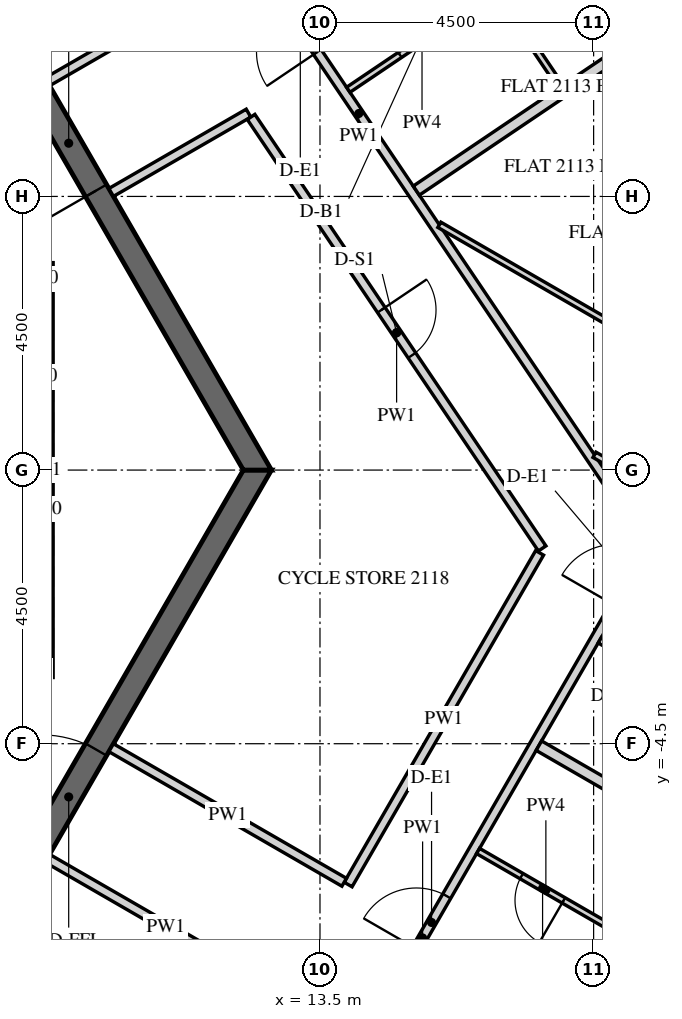
"""IFC4 building model, lengths in metres.
Left out: names, types, materials, properties, quantities, classifications, styles, units other than length and angle.
Written with IfcOpenShell. Run it as: python <this file> out.ifc"""

import sys

from ifc_helpers import new_model, si_unit, direction, frame, frame_2d, origin, place, context, subcontext, project, spatial, polyline, rectangle, outline, extrude, element, fill, save


model = new_model("IFC4")
c1 = context("Model", 3, precision=1e-05, world=origin(), true_north=direction((0.0, 1.0)))
c2 = subcontext(c1, "Body", "Model", "MODEL_VIEW")
j1 = project(units=[si_unit("LENGTHUNIT", "METRE"), si_unit("PLANEANGLEUNIT", "RADIAN")], contexts=[c1])
p1 = place(None, origin())
s1 = spatial("IfcSite", under=j1, at=p1, CompositionType="ELEMENT")
p2 = place(p1, origin())
s2 = spatial("IfcBuilding", under=s1, at=p2, CompositionType="ELEMENT")
p3 = place(p2, frame((0.0, 0.0, 267.9)))
s3 = spatial("IfcBuildingStorey", under=s2, at=p3, CompositionType="ELEMENT", Elevation=267.9)
p4 = place(p3, frame((16.451, -23.005, -0.15), z_axis=(0.0, 0.0, 1.0), x_axis=(0.500003737743, 0.866023245787, 0.0)))
e1 = element("IfcWall", 1, at=p4, inside=s3, PredefinedType="SOLIDWALL", context=c2, shape_type="SweptSolid", body=[
    extrude(outline(polyline([(-0.021, -0.25), (25.468, -0.25), (25.421, 0.25), (0.021, 0.25), (-0.021, -0.25)])), origin(), (0.0, 0.0, 1.0), 3.9),
])
p5 = place(p4, frame((2.522, 0.0, 0.75)))
e2 = element("IfcOpeningElement", 2, at=p5, cuts=e1, PredefinedType="OPENING", context=c2, shape_type="SweptSolid", body=[
    extrude(rectangle(XDim=2.4, YDim=2.7, at=frame_2d((1.2, 1.35))), frame((0.0, 0.26, 0.0), z_axis=(0.0, -1.0, 0.0), x_axis=(1.0, 0.0, 0.0)), (0.0, 0.0, 1.0), 0.52),
])
p6 = place(p4, frame((6.122, 0.0, 0.75)))
e3 = element("IfcOpeningElement", 3, at=p6, cuts=e1, PredefinedType="OPENING", context=c2, shape_type="SweptSolid", body=[
    extrude(rectangle(XDim=2.4, YDim=2.7, at=frame_2d((1.2, 1.35))), frame((0.0, 0.26, 0.0), z_axis=(0.0, -1.0, 0.0), x_axis=(1.0, 0.0, 0.0)), (0.0, 0.0, 1.0), 0.52),
])
p7 = place(p4, frame((9.722, 0.0, 0.75)))
e4 = element("IfcOpeningElement", 4, at=p7, cuts=e1, PredefinedType="OPENING", context=c2, shape_type="SweptSolid", body=[
    extrude(rectangle(XDim=2.4, YDim=2.7, at=frame_2d((1.2, 1.35))), frame((0.0, 0.26, 0.0), z_axis=(0.0, -1.0, 0.0), x_axis=(1.0, 0.0, 0.0)), (0.0, 0.0, 1.0), 0.52),
])
p8 = place(p4, frame((13.323, 0.0, 0.75)))
e5 = element("IfcOpeningElement", 5, at=p8, cuts=e1, PredefinedType="OPENING", context=c2, shape_type="SweptSolid", body=[
    extrude(rectangle(XDim=2.4, YDim=2.7, at=frame_2d((1.2, 1.35))), frame((0.0, 0.26, 0.0), z_axis=(0.0, -1.0, 0.0), x_axis=(1.0, 0.0, 0.0)), (0.0, 0.0, 1.0), 0.52),
])
p9 = place(p4, frame((16.922, 0.0, 0.75)))
e6 = element("IfcOpeningElement", 6, at=p9, cuts=e1, PredefinedType="OPENING", context=c2, shape_type="SweptSolid", body=[
    extrude(rectangle(XDim=2.4, YDim=2.7, at=frame_2d((1.2, 1.35))), frame((0.0, 0.26, 0.0), z_axis=(0.0, -1.0, 0.0), x_axis=(1.0, 0.0, 0.0)), (0.0, 0.0, 1.0), 0.52),
])
p10 = place(p4, frame((20.522, 0.0, 0.75)))
e7 = element("IfcOpeningElement", 7, at=p10, cuts=e1, PredefinedType="OPENING", context=c2, shape_type="SweptSolid", body=[
    extrude(rectangle(XDim=2.4, YDim=2.7, at=frame_2d((1.2, 1.35))), frame((0.0, 0.26, 0.0), z_axis=(0.0, -1.0, 0.0), x_axis=(1.0, 0.0, 0.0)), (0.0, 0.0, 1.0), 0.52),
])
p11 = place(p3, frame((26.706, 2.879, -0.15), z_axis=(0.0, 0.0, 1.0), x_axis=(-0.559197891507, 0.829034208061, 0.0)))
e8 = element("IfcWall", 8, at=p11, inside=s3, PredefinedType="SOLIDWALL", context=c2, shape_type="SweptSolid", body=[
    extrude(outline(polyline([(0.25, -0.25), (22.795, -0.25), (23.295, 0.25), (-0.25, 0.25), (0.25, -0.25)])), origin(), (0.0, 0.0, 1.0), 3.9),
])
p12 = place(p11, frame((1.323, 0.0, 1.05)))
e9 = element("IfcOpeningElement", 9, at=p12, cuts=e8, PredefinedType="OPENING", context=c2, shape_type="SweptSolid", body=[
    extrude(rectangle(XDim=0.9, YDim=1.5, at=frame_2d((0.45, 0.75))), frame((0.0, 0.26, 0.0), z_axis=(0.0, -1.0, 0.0), x_axis=(1.0, 0.0, 0.0)), (0.0, 0.0, 1.0), 0.52),
])
p13 = place(p11, frame((2.522, 0.0, 0.15)))
e10 = element("IfcOpeningElement", 10, at=p13, cuts=e8, PredefinedType="OPENING", context=c2, shape_type="SweptSolid", body=[
    extrude(rectangle(XDim=1.2, YDim=2.4, at=frame_2d((0.6, 1.2))), frame((0.0, 0.26, 0.0), z_axis=(0.0, -1.0, 0.0), x_axis=(1.0, 0.0, 0.0)), (0.0, 0.0, 1.0), 0.52),
])
p14 = place(p11, frame((4.922, 0.0, 1.05)))
e11 = element("IfcOpeningElement", 11, at=p14, cuts=e8, PredefinedType="OPENING", context=c2, shape_type="SweptSolid", body=[
    extrude(rectangle(XDim=0.9, YDim=1.5, at=frame_2d((0.45, 0.75))), frame((0.0, 0.26, 0.0), z_axis=(0.0, -1.0, 0.0), x_axis=(1.0, 0.0, 0.0)), (0.0, 0.0, 1.0), 0.52),
])
p15 = place(p11, frame((6.122, 0.0, 0.15)))
e12 = element("IfcOpeningElement", 12, at=p15, cuts=e8, PredefinedType="OPENING", context=c2, shape_type="SweptSolid", body=[
    extrude(rectangle(XDim=1.2, YDim=2.4, at=frame_2d((0.6, 1.2))), frame((0.0, 0.26, 0.0), z_axis=(0.0, -1.0, 0.0), x_axis=(1.0, 0.0, 0.0)), (0.0, 0.0, 1.0), 0.52),
])
p16 = place(p11, frame((8.522, 0.0, 1.05)))
e13 = element("IfcOpeningElement", 13, at=p16, cuts=e8, PredefinedType="OPENING", context=c2, shape_type="SweptSolid", body=[
    extrude(rectangle(XDim=0.9, YDim=1.5, at=frame_2d((0.45, 0.75))), frame((0.0, 0.26, 0.0), z_axis=(0.0, -1.0, 0.0), x_axis=(1.0, 0.0, 0.0)), (0.0, 0.0, 1.0), 0.52),
])
p17 = place(p11, frame((9.722, 0.0, 0.15)))
e14 = element("IfcOpeningElement", 14, at=p17, cuts=e8, PredefinedType="OPENING", context=c2, shape_type="SweptSolid", body=[
    extrude(rectangle(XDim=1.2, YDim=2.4, at=frame_2d((0.6, 1.2))), frame((0.0, 0.26, 0.0), z_axis=(0.0, -1.0, 0.0), x_axis=(1.0, 0.0, 0.0)), (0.0, 0.0, 1.0), 0.52),
])
p18 = place(p11, frame((12.122, 0.0, 1.05)))
e15 = element("IfcOpeningElement", 15, at=p18, cuts=e8, PredefinedType="OPENING", context=c2, shape_type="SweptSolid", body=[
    extrude(rectangle(XDim=0.9, YDim=1.5, at=frame_2d((0.45, 0.75))), frame((0.0, 0.26, 0.0), z_axis=(0.0, -1.0, 0.0), x_axis=(1.0, 0.0, 0.0)), (0.0, 0.0, 1.0), 0.52),
])
p19 = place(p11, frame((13.323, 0.0, 0.15)))
e16 = element("IfcOpeningElement", 16, at=p19, cuts=e8, PredefinedType="OPENING", context=c2, shape_type="SweptSolid", body=[
    extrude(rectangle(XDim=1.2, YDim=2.4, at=frame_2d((0.6, 1.2))), frame((0.0, 0.26, 0.0), z_axis=(0.0, -1.0, 0.0), x_axis=(1.0, 0.0, 0.0)), (0.0, 0.0, 1.0), 0.52),
])
p20 = place(p11, frame((15.722, 0.0, 1.05)))
e17 = element("IfcOpeningElement", 17, at=p20, cuts=e8, PredefinedType="OPENING", context=c2, shape_type="SweptSolid", body=[
    extrude(rectangle(XDim=0.9, YDim=1.5, at=frame_2d((0.45, 0.75))), frame((0.0, 0.26, 0.0), z_axis=(0.0, -1.0, 0.0), x_axis=(1.0, 0.0, 0.0)), (0.0, 0.0, 1.0), 0.52),
])
p21 = place(p11, frame((16.922, 0.0, 0.15)))
e18 = element("IfcOpeningElement", 18, at=p21, cuts=e8, PredefinedType="OPENING", context=c2, shape_type="SweptSolid", body=[
    extrude(rectangle(XDim=1.2, YDim=2.4, at=frame_2d((0.6, 1.2))), frame((0.0, 0.26, 0.0), z_axis=(0.0, -1.0, 0.0), x_axis=(1.0, 0.0, 0.0)), (0.0, 0.0, 1.0), 0.52),
])
p22 = place(p11, frame((19.323, 0.0, 1.05)))
e19 = element("IfcOpeningElement", 19, at=p22, cuts=e8, PredefinedType="OPENING", context=c2, shape_type="SweptSolid", body=[
    extrude(rectangle(XDim=0.9, YDim=1.5, at=frame_2d((0.45, 0.75))), frame((0.0, 0.26, 0.0), z_axis=(0.0, -1.0, 0.0), x_axis=(1.0, 0.0, 0.0)), (0.0, 0.0, 1.0), 0.52),
])
p23 = place(p11, frame((20.522, 0.0, 0.15)))
e20 = element("IfcOpeningElement", 20, at=p23, cuts=e8, PredefinedType="OPENING", context=c2, shape_type="SweptSolid", body=[
    extrude(rectangle(XDim=1.2, YDim=2.4, at=frame_2d((0.6, 1.2))), frame((0.0, 0.26, 0.0), z_axis=(0.0, -1.0, 0.0), x_axis=(1.0, 0.0, 0.0)), (0.0, 0.0, 1.0), 0.52),
])
p24 = place(p3, frame((6.235, -10.8, -0.15), z_axis=(0.0, 0.0, 1.0), x_axis=(0.499996419489, 0.866027470984, 0.0)))
e21 = element("IfcWall", 21, at=p24, inside=s3, PredefinedType="SHEAR", context=c2, shape_type="SweptSolid", body=[
    extrude(outline(polyline([(-0.115, -0.2), (12.586, -0.2), (12.355, 0.2), (0.115, 0.2), (-0.115, -0.2)])), origin(), (0.0, 0.0, 1.0), 3.9),
])
p25 = place(p24, frame((5.364, 0.0, 0.15)))
e22 = element("IfcOpeningElement", 22, at=p25, cuts=e21, PredefinedType="OPENING", context=c2, shape_type="SweptSolid", body=[
    extrude(rectangle(XDim=1.8, YDim=2.4, at=frame_2d((0.9, 1.2))), frame((0.0, 0.21, 0.0), z_axis=(0.0, -1.0, 0.0), x_axis=(1.0, 0.0, 0.0)), (0.0, 0.0, 1.0), 0.42),
])
p26 = place(p3, frame((12.471, 0.0, -0.15), z_axis=(0.0, 0.0, 1.0), x_axis=(-0.499996419489, 0.866027470984, 0.0)))
e23 = element("IfcWall", 23, at=p26, inside=s3, PredefinedType="SHEAR", context=c2, shape_type="SweptSolid", body=[
    extrude(outline(polyline([(-0.115, -0.2), (12.586, -0.2), (12.355, 0.2), (0.115, 0.2), (-0.115, -0.2)])), origin(), (0.0, 0.0, 1.0), 3.9),
])
p27 = place(p26, frame((5.306, 0.0, 0.15)))
e24 = element("IfcOpeningElement", 24, at=p27, cuts=e23, PredefinedType="OPENING", context=c2, shape_type="SweptSolid", body=[
    extrude(rectangle(XDim=1.8, YDim=2.4, at=frame_2d((0.9, 1.2))), frame((0.0, 0.21, 0.0), z_axis=(0.0, -1.0, 0.0), x_axis=(1.0, 0.0, 0.0)), (0.0, 0.0, 1.0), 0.42),
])
p28 = place(p3, frame((11.454, -14.16, 0.0), z_axis=(0.0, 0.0, 1.0), x_axis=(0.500000296604, 0.86602523254, 0.0)))
e25 = element("IfcWall", 25, at=p28, inside=s3, PredefinedType="PARTITIONING", context=c2, shape_type="SweptSolid", body=[
    extrude(rectangle(XDim=14.934, YDim=0.15, at=frame_2d((7.467, 0.0))), origin(), (0.0, 0.0, 1.0), 2.988),
])
p29 = place(p28, frame((7.261, 0.0, 0.0)))
e26 = element("IfcOpeningElement", 26, at=p29, cuts=e25, PredefinedType="OPENING", context=c2, shape_type="SweptSolid", body=[
    extrude(rectangle(XDim=1.0, YDim=2.1, at=frame_2d((0.5, 1.05))), frame((0.0, 0.085, 0.0), z_axis=(0.0, -1.0, 0.0), x_axis=(1.0, 0.0, 0.0)), (0.0, 0.0, 1.0), 0.17),
])
p30 = place(p28, frame((13.784, 0.0, 0.0)))
e27 = element("IfcOpeningElement", 27, at=p30, cuts=e25, PredefinedType="OPENING", context=c2, shape_type="SweptSolid", body=[
    extrude(rectangle(XDim=1.0, YDim=2.1, at=frame_2d((0.5, 1.05))), frame((0.0, 0.085, 0.0), z_axis=(0.0, -1.0, 0.0), x_axis=(1.0, 0.0, 0.0)), (0.0, 0.0, 1.0), 0.17),
])
p31 = place(p3, frame((18.875, -1.158, 0.0), z_axis=(0.0, 0.0, 1.0), x_axis=(-0.55919880344, 0.829033592945, 0.0)))
e28 = element("IfcWall", 28, at=p31, inside=s3, PredefinedType="PARTITIONING", context=c2, shape_type="SweptSolid", body=[
    extrude(rectangle(XDim=16.939, YDim=0.15, at=frame_2d((8.47, 0.0))), origin(), (0.0, 0.0, 1.0), 2.988),
])
p32 = place(p31, frame((9.69, 0.0, 0.0)))
e29 = element("IfcOpeningElement", 29, at=p32, cuts=e28, PredefinedType="OPENING", context=c2, shape_type="SweptSolid", body=[
    extrude(rectangle(XDim=1.0, YDim=2.1, at=frame_2d((0.5, 1.05))), frame((0.0, 0.085, 0.0), z_axis=(0.0, -1.0, 0.0), x_axis=(1.0, 0.0, 0.0)), (0.0, 0.0, 1.0), 0.17),
])
p33 = place(p3, frame((10.066, 4.566, 0.0), z_axis=(0.0, 0.0, 1.0), x_axis=(0.866034402474, 0.499984413489, 0.0)))
e30 = element("IfcWall", 30, at=p33, inside=s3, PredefinedType="PARTITIONING", context=c2, shape_type="SweptSolid", body=[
    extrude(rectangle(XDim=2.608, YDim=0.15, at=frame_2d((1.304, 0.0))), origin(), (0.0, 0.0, 1.0), 2.988),
])
p34 = place(p3, frame((12.367, 5.808, 0.0), z_axis=(0.0, 0.0, 1.0), x_axis=(0.559187256666, -0.829041381345, 0.0)))
e31 = element("IfcWall", 31, at=p34, inside=s3, PredefinedType="PARTITIONING", context=c2, shape_type="SweptSolid", body=[
    extrude(rectangle(XDim=8.56, YDim=0.15, at=frame_2d((4.28, 0.0))), origin(), (0.0, 0.0, 1.0), 2.988),
])
p35 = place(p34, frame((3.83, 0.0, 0.0)))
e32 = element("IfcOpeningElement", 32, at=p35, cuts=e31, PredefinedType="OPENING", context=c2, shape_type="SweptSolid", body=[
    extrude(rectangle(XDim=0.9, YDim=2.1, at=frame_2d((0.45, 1.05))), frame((0.0, 0.085, 0.0), z_axis=(0.0, -1.0, 0.0), x_axis=(1.0, 0.0, 0.0)), (0.0, 0.0, 1.0), 0.17),
])
p36 = place(p3, frame((17.112, -1.362, 0.0), z_axis=(0.0, 0.0, 1.0), x_axis=(-0.49999985423, -0.866025487945, 0.0)))
e33 = element("IfcWall", 33, at=p36, inside=s3, PredefinedType="PARTITIONING", context=c2, shape_type="SweptSolid", body=[
    extrude(rectangle(XDim=6.298, YDim=0.15, at=frame_2d((3.149, 0.0))), origin(), (0.0, 0.0, 1.0), 2.988),
])
p37 = place(p3, frame((13.898, -6.778, 0.0), z_axis=(0.0, 0.0, 1.0), x_axis=(-0.866041342403, 0.499972392486, 0.0)))
e34 = element("IfcWall", 34, at=p37, inside=s3, PredefinedType="PARTITIONING", context=c2, shape_type="SweptSolid", body=[
    extrude(rectangle(XDim=4.425, YDim=0.15, at=frame_2d((2.212, 0.0))), origin(), (0.0, 0.0, 1.0), 2.988),
])
p38 = place(p3, frame((9.016, -6.384, 0.0), z_axis=(0.0, 0.0, 1.0), x_axis=(0.866031096941, -0.499990139034, 0.0)))
e35 = element("IfcWall", 35, at=p38, inside=s3, PredefinedType="PARTITIONING", context=c2, shape_type="SweptSolid", body=[
    extrude(rectangle(XDim=4.5, YDim=0.15, at=frame_2d((2.25, 0.0))), origin(), (0.0, 0.0, 1.0), 2.988),
])
p39 = place(p3, frame((11.082, 7.578, 0.0), z_axis=(0.0, 0.0, 1.0), x_axis=(-0.865993065409, -0.500056007527, 0.0)))
e36 = element("IfcWall", 36, at=p39, inside=s3, PredefinedType="PARTITIONING", context=c2, shape_type="SweptSolid", body=[
    extrude(rectangle(XDim=2.386, YDim=0.15, at=frame_2d((1.193, 0.0))), origin(), (0.0, 0.0, 1.0), 2.988),
])
p40 = place(p3, frame((18.33, -7.552, 0.0), z_axis=(0.0, 0.0, 1.0), x_axis=(-0.866046643894, 0.499963209246, 0.0)))
e37 = element("IfcWall", 37, at=p40, inside=s3, PredefinedType="PARTITIONING", context=c2, shape_type="SweptSolid", body=[
    extrude(rectangle(XDim=2.575, YDim=0.1, at=frame_2d((1.288, 0.0))), origin(), (0.0, 0.0, 1.0), 2.988),
])
p41 = place(p40, frame((0.95, 0.0, 0.0)))
e38 = element("IfcOpeningElement", 38, at=p41, cuts=e37, PredefinedType="OPENING", context=c2, shape_type="SweptSolid", body=[
    extrude(rectangle(XDim=0.8, YDim=2.1, at=frame_2d((0.4, 1.05))), frame((0.0, 0.06, 0.0), z_axis=(0.0, -1.0, 0.0), x_axis=(1.0, 0.0, 0.0)), (0.0, 0.0, 1.0), 0.12),
])
p42 = place(p3, frame((24.396, -8.745, 0.0), z_axis=(0.0, 0.0, 1.0), x_axis=(-0.866014270972, 0.500019282102, 0.0)))
e39 = element("IfcWall", 39, at=p42, inside=s3, PredefinedType="PARTITIONING", context=c2, shape_type="SweptSolid", body=[
    extrude(rectangle(XDim=8.425, YDim=0.18, at=frame_2d((4.212, 0.0))), origin(), (0.0, 0.0, 1.0), 2.988),
])
p43 = place(p3, frame((15.463, 4.034, 0.0), z_axis=(0.0, 0.0, 1.0), x_axis=(0.866033324905, -0.499986279965, 0.0)))
e40 = element("IfcWall", 40, at=p43, inside=s3, PredefinedType="PARTITIONING", context=c2, shape_type="SweptSolid", body=[
    extrude(rectangle(XDim=9.426, YDim=0.1, at=frame_2d((4.713, 0.0))), origin(), (0.0, 0.0, 1.0), 2.988),
])
p44 = place(p3, frame((22.069, 9.307, 0.0), z_axis=(0.0, 0.0, 1.0), x_axis=(-0.829046823816, -0.559179187668, 0.0)))
e41 = element("IfcWall", 41, at=p44, inside=s3, PredefinedType="PARTITIONING", context=c2, shape_type="SweptSolid", body=[
    extrude(rectangle(XDim=8.425, YDim=0.18, at=frame_2d((4.213, 0.0))), origin(), (0.0, 0.0, 1.0), 2.988),
])
p45 = place(p3, frame((18.1, -2.8, 0.0), z_axis=(0.0, 0.0, 1.0), x_axis=(0.866012039196, -0.500023147432, 0.0)))
e42 = element("IfcWall", 42, at=p45, inside=s3, PredefinedType="PARTITIONING", context=c2, shape_type="SweptSolid", body=[
    extrude(rectangle(XDim=3.725, YDim=0.1, at=frame_2d((1.862, 0.0))), origin(), (0.0, 0.0, 1.0), 2.988),
])
p46 = place(p45, frame((1.425, 0.0, 0.0)))
e43 = element("IfcOpeningElement", 43, at=p46, cuts=e42, PredefinedType="OPENING", context=c2, shape_type="SweptSolid", body=[
    extrude(rectangle(XDim=0.8, YDim=2.1, at=frame_2d((0.4, 1.05))), frame((0.0, 0.06, 0.0), z_axis=(0.0, -1.0, 0.0), x_axis=(1.0, 0.0, 0.0)), (0.0, 0.0, 1.0), 0.12),
])
p47 = place(p3, frame((22.626, -2.411, 0.0), z_axis=(0.0, 0.0, 1.0), x_axis=(-0.866016851835, 0.500014812119, 0.0)))
e44 = element("IfcWall", 44, at=p47, inside=s3, PredefinedType="PARTITIONING", context=c2, shape_type="SweptSolid", body=[
    extrude(rectangle(XDim=5.325, YDim=0.1, at=frame_2d((2.663, 0.0))), origin(), (0.0, 0.0, 1.0), 2.988),
])
p48 = place(p47, frame((1.5, 0.0, 0.0)))
e45 = element("IfcOpeningElement", 45, at=p48, cuts=e44, PredefinedType="OPENING", context=c2, shape_type="SweptSolid", body=[
    extrude(rectangle(XDim=0.8, YDim=2.1, at=frame_2d((0.4, 1.05))), frame((0.0, 0.06, 0.0), z_axis=(0.0, -1.0, 0.0), x_axis=(1.0, 0.0, 0.0)), (0.0, 0.0, 1.0), 0.12),
])
p49 = place(p3, frame((13.966, 6.254, 0.0), z_axis=(0.0, 0.0, 1.0), x_axis=(0.829046031219, 0.559180362781, 0.0)))
e46 = element("IfcWall", 46, at=p49, inside=s3, PredefinedType="PARTITIONING", context=c2, shape_type="SweptSolid", body=[
    extrude(rectangle(XDim=2.925, YDim=0.1, at=frame_2d((1.462, 0.0))), origin(), (0.0, 0.0, 1.0), 2.988),
])
p50 = place(p49, frame((1.025, 0.0, 0.0)))
e47 = element("IfcOpeningElement", 47, at=p50, cuts=e46, PredefinedType="OPENING", context=c2, shape_type="SweptSolid", body=[
    extrude(rectangle(XDim=0.8, YDim=2.1, at=frame_2d((0.4, 1.05))), frame((0.0, 0.06, 0.0), z_axis=(0.0, -1.0, 0.0), x_axis=(1.0, 0.0, 0.0)), (0.0, 0.0, 1.0), 0.12),
])
p51 = place(p3, frame((17.458, 6.306, 0.0), z_axis=(0.0, 0.0, 1.0), x_axis=(-0.559200351269, 0.829032548903, 0.0)))
e48 = element("IfcWall", 48, at=p51, inside=s3, PredefinedType="PARTITIONING", context=c2, shape_type="SweptSolid", body=[
    extrude(rectangle(XDim=1.862, YDim=0.1, at=frame_2d((0.931, 0.0))), origin(), (0.0, 0.0, 1.0), 2.988),
])
p52 = place(p27, origin())
e49 = element("IfcDoor", 49, at=p52, inside=s3, OperationType="DOUBLE_DOOR_SINGLE_SWING", PredefinedType="DOOR", context=c2, shape_type="SweptSolid", body=[
    extrude(rectangle(XDim=1.8, YDim=2.4, at=frame_2d((0.9, 1.2))), frame((0.0, 0.025, 0.0), z_axis=(0.0, -1.0, 0.0), x_axis=(1.0, 0.0, 0.0)), (0.0, 0.0, 1.0), 0.05),
])
fill(e24, e49)
p53 = place(p25, origin())
e50 = element("IfcDoor", 50, at=p53, inside=s3, OperationType="DOUBLE_DOOR_SINGLE_SWING", PredefinedType="DOOR", context=c2, shape_type="SweptSolid", body=[
    extrude(rectangle(XDim=1.8, YDim=2.4, at=frame_2d((0.9, 1.2))), frame((0.0, 0.025, 0.0), z_axis=(0.0, -1.0, 0.0), x_axis=(1.0, 0.0, 0.0)), (0.0, 0.0, 1.0), 0.05),
])
fill(e22, e50)
p54 = place(p29, origin())
e51 = element("IfcDoor", 51, at=p54, inside=s3, OperationType="SINGLE_SWING_RIGHT", PredefinedType="DOOR", context=c2, shape_type="SweptSolid", body=[
    extrude(rectangle(XDim=1.0, YDim=2.1, at=frame_2d((0.5, 1.05))), frame((0.0, 0.025, 0.0), z_axis=(0.0, -1.0, 0.0), x_axis=(1.0, 0.0, 0.0)), (0.0, 0.0, 1.0), 0.05),
])
fill(e26, e51)
p55 = place(p41, origin())
e52 = element("IfcDoor", 52, at=p55, inside=s3, OperationType="SINGLE_SWING_LEFT", PredefinedType="DOOR", context=c2, shape_type="SweptSolid", body=[
    extrude(rectangle(XDim=0.8, YDim=2.1, at=frame_2d((0.4, 1.05))), frame((0.0, 0.025, 0.0), z_axis=(0.0, -1.0, 0.0), x_axis=(1.0, 0.0, 0.0)), (0.0, 0.0, 1.0), 0.05),
])
fill(e38, e52)
p56 = place(p32, origin())
e53 = element("IfcDoor", 53, at=p56, inside=s3, OperationType="SINGLE_SWING_RIGHT", PredefinedType="DOOR", context=c2, shape_type="SweptSolid", body=[
    extrude(rectangle(XDim=1.0, YDim=2.1, at=frame_2d((0.5, 1.05))), frame((0.0, 0.025, 0.0), z_axis=(0.0, -1.0, 0.0), x_axis=(1.0, 0.0, 0.0)), (0.0, 0.0, 1.0), 0.05),
])
fill(e29, e53)
p57 = place(p50, origin())
e54 = element("IfcDoor", 54, at=p57, inside=s3, OperationType="SINGLE_SWING_RIGHT", PredefinedType="DOOR", context=c2, shape_type="SweptSolid", body=[
    extrude(rectangle(XDim=0.8, YDim=2.1, at=frame_2d((0.4, 1.05))), frame((0.0, 0.025, 0.0), z_axis=(0.0, -1.0, 0.0), x_axis=(1.0, 0.0, 0.0)), (0.0, 0.0, 1.0), 0.05),
])
fill(e47, e54)
p58 = place(p35, origin())
e55 = element("IfcDoor", 55, at=p58, inside=s3, OperationType="SINGLE_SWING_RIGHT", PredefinedType="DOOR", context=c2, shape_type="SweptSolid", body=[
    extrude(rectangle(XDim=0.9, YDim=2.1, at=frame_2d((0.45, 1.05))), frame((0.0, 0.025, 0.0), z_axis=(0.0, -1.0, 0.0), x_axis=(1.0, 0.0, 0.0)), (0.0, 0.0, 1.0), 0.05),
])
fill(e32, e55)
save(model, sys.argv[1])
